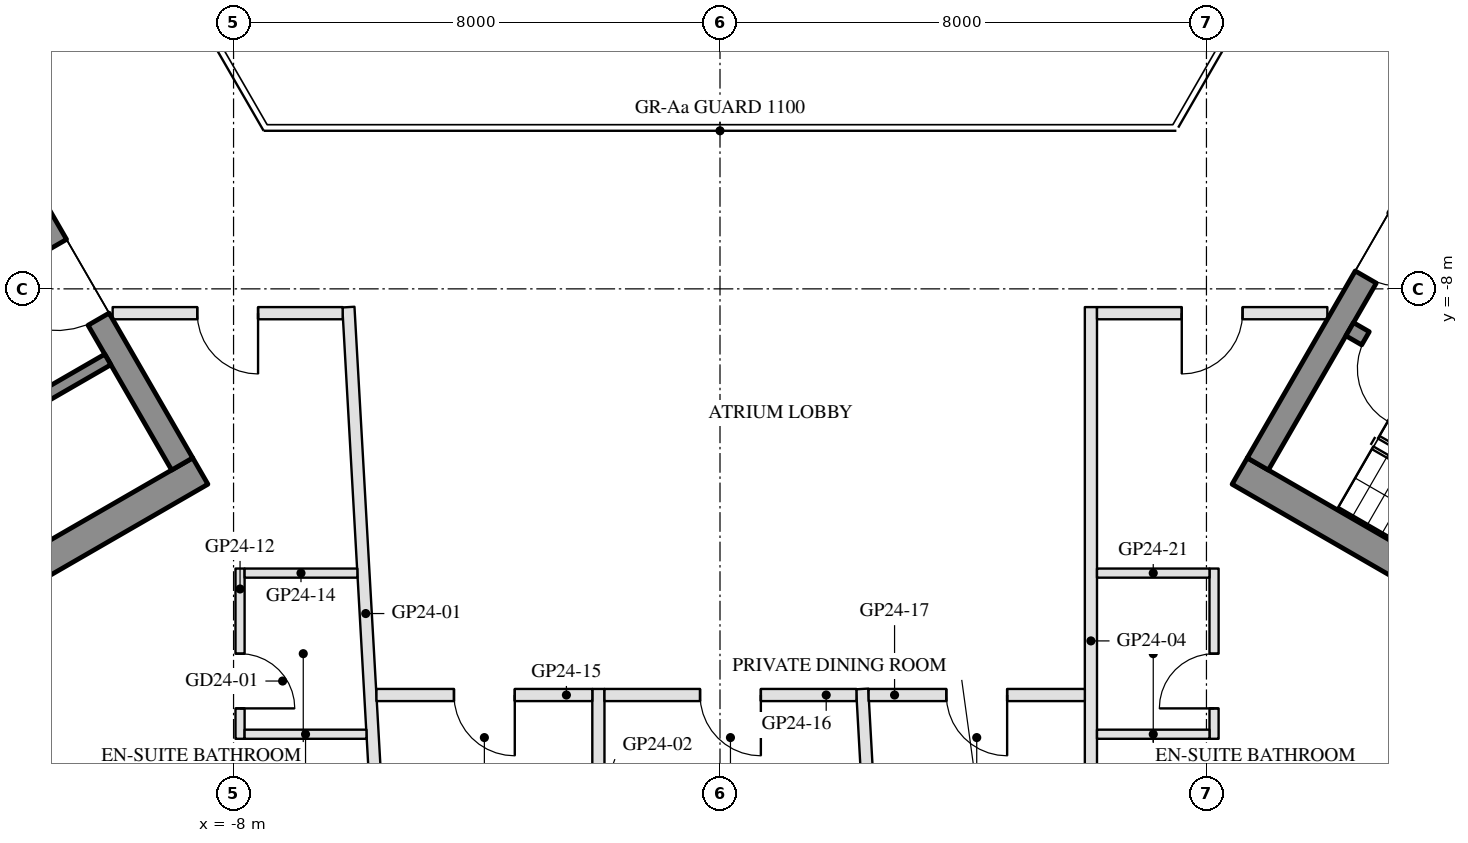
"""IFC4 building model, lengths in metres.
Left out: names, types, materials, properties, quantities, classifications, styles, units other than length and angle.
Written with IfcOpenShell. Run it as: python <this file> out.ifc"""

import sys

from ifc_helpers import new_model, si_unit, direction, frame, frame_2d, origin, place, context, subcontext, project, spatial, rectangle, extrude, element, fill, save


model = new_model("IFC4")
c1 = context("Model", 3, precision=1e-05, world=origin(), true_north=direction((0.0, 1.0)))
c2 = subcontext(c1, "Body", "Model", "MODEL_VIEW")
j1 = project(units=[si_unit("LENGTHUNIT", "METRE"), si_unit("PLANEANGLEUNIT", "RADIAN")], contexts=[c1])
p1 = place(None, origin())
s1 = spatial("IfcSite", under=j1, at=p1, CompositionType="ELEMENT")
p2 = place(p1, origin())
s2 = spatial("IfcBuilding", under=s1, at=p2, CompositionType="ELEMENT")
p3 = place(p2, frame((0.0, 0.0, 254.1)))
s3 = spatial("IfcBuildingStorey", under=s2, at=p3, CompositionType="ELEMENT", Elevation=254.1)
p4 = place(p3, frame((-8.547, -10.997, 0.0), z_axis=(0.0, 0.0, 1.0), x_axis=(-0.866025009528, -0.500000682871, 0.0)))
e1 = element("IfcWall", 1, at=p4, inside=s3, PredefinedType="SHEAR", context=c2, shape_type="SweptSolid", body=[
    extrude(rectangle(XDim=14.837, YDim=0.5, at=frame_2d((7.418, 0.0))), origin(), (0.0, 0.0, 1.0), 3.5),
])
p5 = place(p3, frame((-13.845, -2.22, 0.0), z_axis=(0.0, 0.0, 1.0), x_axis=(0.500004234368, -0.866022959057, 0.0)))
e2 = element("IfcWall", 2, at=p5, inside=s3, PredefinedType="SHEAR", context=c2, shape_type="SweptSolid", body=[
    extrude(rectangle(XDim=10.0, YDim=0.4, at=frame_2d((5.0, 0.0))), origin(), (0.0, 0.0, 1.0), 3.5),
])
p6 = place(p5, frame((3.55, 0.0, 0.0)))
e3 = element("IfcOpeningElement", 3, at=p6, cuts=e2, PredefinedType="OPENING", context=c2, shape_type="SweptSolid", body=[
    extrude(rectangle(XDim=1.1, YDim=2.1, at=frame_2d((0.55, 1.05))), frame((0.0, 0.21, 0.0), z_axis=(0.0, -1.0, 0.0), x_axis=(1.0, 0.0, 0.0)), (0.0, 0.0, 1.0), 0.42),
])
p7 = place(p5, frame((5.85, 0.0, 0.0)))
e4 = element("IfcOpeningElement", 4, at=p7, cuts=e2, PredefinedType="OPENING", context=c2, shape_type="SweptSolid", body=[
    extrude(rectangle(XDim=1.4, YDim=2.1, at=frame_2d((0.7, 1.05))), frame((0.0, 0.21, 0.0), z_axis=(0.0, -1.0, 0.0), x_axis=(1.0, 0.0, 0.0)), (0.0, 0.0, 1.0), 0.42),
])
p8 = place(p3, frame((-10.068, -9.162, 0.0), z_axis=(0.0, 0.0, 1.0), x_axis=(-0.866032725843, -0.499987317609, 0.0)))
e5 = element("IfcWall", 5, at=p8, inside=s3, PredefinedType="SHEAR", context=c2, shape_type="SweptSolid", body=[
    extrude(rectangle(XDim=10.16, YDim=0.2, at=frame_2d((5.08, 0.0))), origin(), (0.0, 0.0, 1.0), 3.5),
])
p9 = place(p8, frame((1.99, 0.0, 0.0)))
e6 = element("IfcOpeningElement", 6, at=p9, cuts=e5, PredefinedType="OPENING", context=c2, shape_type="SweptSolid", body=[
    extrude(rectangle(XDim=0.9, YDim=2.1, at=frame_2d((0.45, 1.05))), frame((0.0, 0.11, 0.0), z_axis=(0.0, -1.0, 0.0), x_axis=(1.0, 0.0, 0.0)), (0.0, 0.0, 1.0), 0.22),
])
p10 = place(p8, frame((7.07, 0.0, 0.0)))
e7 = element("IfcOpeningElement", 7, at=p10, cuts=e5, PredefinedType="OPENING", context=c2, shape_type="SweptSolid", body=[
    extrude(rectangle(XDim=0.9, YDim=2.1, at=frame_2d((0.45, 1.05))), frame((0.0, 0.11, 0.0), z_axis=(0.0, -1.0, 0.0), x_axis=(1.0, 0.0, 0.0)), (0.0, 0.0, 1.0), 0.22),
])
p11 = place(p3, frame((8.547, -10.997, 0.0), z_axis=(0.0, 0.0, 1.0), x_axis=(0.866025009528, -0.500000682871, 0.0)))
e8 = element("IfcWall", 8, at=p11, inside=s3, PredefinedType="SHEAR", context=c2, shape_type="SweptSolid", body=[
    extrude(rectangle(XDim=14.837, YDim=0.5, at=frame_2d((7.418, 0.0))), origin(), (0.0, 0.0, 1.0), 3.5),
])
p12 = place(p3, frame((8.845, -10.88, 0.0), z_axis=(0.0, 0.0, 1.0), x_axis=(0.500004234368, 0.866022959057, 0.0)))
e9 = element("IfcWall", 9, at=p12, inside=s3, PredefinedType="SHEAR", context=c2, shape_type="SweptSolid", body=[
    extrude(rectangle(XDim=10.0, YDim=0.4, at=frame_2d((5.0, 0.0))), origin(), (0.0, 0.0, 1.0), 3.5),
])
p13 = place(p12, frame((3.55, 0.0, 0.0)))
e10 = element("IfcOpeningElement", 10, at=p13, cuts=e9, PredefinedType="OPENING", context=c2, shape_type="SweptSolid", body=[
    extrude(rectangle(XDim=1.1, YDim=2.1, at=frame_2d((0.55, 1.05))), frame((0.0, 0.21, 0.0), z_axis=(0.0, -1.0, 0.0), x_axis=(1.0, 0.0, 0.0)), (0.0, 0.0, 1.0), 0.42),
])
p14 = place(p12, frame((5.85, 0.0, 0.0)))
e11 = element("IfcOpeningElement", 11, at=p14, cuts=e9, PredefinedType="OPENING", context=c2, shape_type="SweptSolid", body=[
    extrude(rectangle(XDim=1.4, YDim=2.1, at=frame_2d((0.7, 1.05))), frame((0.0, 0.21, 0.0), z_axis=(0.0, -1.0, 0.0), x_axis=(1.0, 0.0, 0.0)), (0.0, 0.0, 1.0), 0.42),
])
p15 = place(p3, frame((10.356, -8.664, 0.0), z_axis=(0.0, 0.0, 1.0), x_axis=(0.866028629588, -0.499994412703, 0.0)))
e12 = element("IfcWall", 12, at=p15, inside=s3, PredefinedType="SHEAR", context=c2, shape_type="SweptSolid", body=[
    extrude(rectangle(XDim=6.45, YDim=0.25, at=frame_2d((3.225, 0.0))), origin(), (0.0, 0.0, 1.0), 3.5),
])
p16 = place(p15, frame((0.3, 0.0, 0.0)))
e13 = element("IfcOpeningElement", 13, at=p16, cuts=e12, PredefinedType="OPENING", context=c2, shape_type="SweptSolid", body=[
    extrude(rectangle(XDim=1.0, YDim=2.1, at=frame_2d((0.5, 1.05))), frame((0.0, 0.135, 0.0), z_axis=(0.0, -1.0, 0.0), x_axis=(1.0, 0.0, 0.0)), (0.0, 0.0, 1.0), 0.27),
])
p17 = place(p3, frame((-5.541, -18.38, 0.0), z_axis=(0.0, 0.0, 1.0), x_axis=(-0.056489207214, 0.998403209865, 0.0)))
e14 = element("IfcWall", 14, at=p17, inside=s3, PredefinedType="PARTITIONING", context=c2, shape_type="SweptSolid", body=[
    extrude(rectangle(XDim=10.096, YDim=0.2, at=frame_2d((5.048, 0.0))), origin(), (0.0, 0.0, 1.0), 3.1),
])
p18 = place(p3, frame((-2.0, -18.38, 0.0), z_axis=(0.0, 0.0, 1.0), x_axis=(0.0, 1.0, 0.0)))
e15 = element("IfcWall", 15, at=p18, inside=s3, PredefinedType="PARTITIONING", context=c2, shape_type="SweptSolid", body=[
    extrude(rectangle(XDim=3.8, YDim=0.2, at=frame_2d((1.9, 0.0))), origin(), (0.0, 0.0, 1.0), 3.1),
])
p19 = place(p3, frame((2.6, -19.28, 0.0), z_axis=(0.0, 0.0, 1.0), x_axis=(-0.055599282702, 0.99845316353, 0.0)))
e16 = element("IfcWall", 16, at=p19, inside=s3, PredefinedType="PARTITIONING", context=c2, shape_type="SweptSolid", body=[
    extrude(rectangle(XDim=4.707, YDim=0.2, at=frame_2d((2.354, 0.0))), origin(), (0.0, 0.0, 1.0), 3.1),
])
p20 = place(p3, frame((6.1, -19.28, 0.0), z_axis=(0.0, 0.0, 1.0), x_axis=(0.0, 1.0, 0.0)))
e17 = element("IfcWall", 17, at=p20, inside=s3, PredefinedType="PARTITIONING", context=c2, shape_type="SweptSolid", body=[
    extrude(rectangle(XDim=10.98, YDim=0.2, at=frame_2d((5.49, 0.0))), origin(), (0.0, 0.0, 1.0), 3.1),
])
p21 = place(p3, frame((-6.206, -8.4, 0.0), z_axis=(0.0, 0.0, 1.0), x_axis=(-1.0, 0.0, 0.0)))
e18 = element("IfcWall", 18, at=p21, inside=s3, PredefinedType="PARTITIONING", context=c2, shape_type="SweptSolid", body=[
    extrude(rectangle(XDim=3.782, YDim=0.2, at=frame_2d((1.891, 0.0))), origin(), (0.0, 0.0, 1.0), 3.0),
])
p22 = place(p21, frame((1.391, 0.0, 0.0)))
e19 = element("IfcOpeningElement", 19, at=p22, cuts=e18, PredefinedType="OPENING", context=c2, shape_type="SweptSolid", body=[
    extrude(rectangle(XDim=1.0, YDim=2.1, at=frame_2d((0.5, 1.05))), frame((0.0, 0.11, 0.0), z_axis=(0.0, -1.0, 0.0), x_axis=(1.0, 0.0, 0.0)), (0.0, 0.0, 1.0), 0.22),
])
p23 = place(p3, frame((-7.893, -12.6, 0.0), z_axis=(0.0, 0.0, 1.0), x_axis=(0.0, -1.0, 0.0)))
e20 = element("IfcWall", 20, at=p23, inside=s3, PredefinedType="PARTITIONING", context=c2, shape_type="SweptSolid", body=[
    extrude(rectangle(XDim=2.8, YDim=0.15, at=frame_2d((1.4, 0.0))), origin(), (0.0, 0.0, 1.0), 3.55),
])
p24 = place(p23, frame((1.4, 0.0, 0.0)))
e21 = element("IfcOpeningElement", 21, at=p24, cuts=e20, PredefinedType="OPENING", context=c2, shape_type="SweptSolid", body=[
    extrude(rectangle(XDim=0.9, YDim=2.1, at=frame_2d((0.45, 1.05))), frame((0.0, 0.085, 0.0), z_axis=(0.0, -1.0, 0.0), x_axis=(1.0, 0.0, 0.0)), (0.0, 0.0, 1.0), 0.17),
])
p25 = place(p3, frame((-7.818, -15.325, 0.0), z_axis=(0.0, 0.0, 1.0), x_axis=(1.0, 0.0, 0.0)))
e22 = element("IfcWall", 22, at=p25, inside=s3, PredefinedType="PARTITIONING", context=c2, shape_type="SweptSolid", body=[
    extrude(rectangle(XDim=2.004, YDim=0.15, at=frame_2d((1.002, 0.0))), origin(), (0.0, 0.0, 1.0), 3.0),
])
p26 = place(p3, frame((-7.818, -12.675, 0.0), z_axis=(0.0, 0.0, 1.0), x_axis=(1.0, 0.0, 0.0)))
e23 = element("IfcWall", 23, at=p26, inside=s3, PredefinedType="PARTITIONING", context=c2, shape_type="SweptSolid", body=[
    extrude(rectangle(XDim=1.854, YDim=0.15, at=frame_2d((0.927, 0.0))), origin(), (0.0, 0.0, 1.0), 3.0),
])
p27 = place(p3, frame((-2.1, -14.68, 0.0), z_axis=(0.0, 0.0, 1.0), x_axis=(-1.0, 0.0, 0.0)))
e24 = element("IfcWall", 24, at=p27, inside=s3, PredefinedType="PARTITIONING", context=c2, shape_type="SweptSolid", body=[
    extrude(rectangle(XDim=3.55, YDim=0.2, at=frame_2d((1.775, 0.0))), origin(), (0.0, 0.0, 1.0), 3.0),
])
p28 = place(p27, frame((1.275, 0.0, 0.0)))
e25 = element("IfcOpeningElement", 25, at=p28, cuts=e24, PredefinedType="OPENING", context=c2, shape_type="SweptSolid", body=[
    extrude(rectangle(XDim=1.0, YDim=2.1, at=frame_2d((0.5, 1.05))), frame((0.0, 0.11, 0.0), z_axis=(0.0, -1.0, 0.0), x_axis=(1.0, 0.0, 0.0)), (0.0, 0.0, 1.0), 0.22),
])
p29 = place(p3, frame((2.244, -14.68, 0.0), z_axis=(0.0, 0.0, 1.0), x_axis=(-1.0, 0.0, 0.0)))
e26 = element("IfcWall", 26, at=p29, inside=s3, PredefinedType="PARTITIONING", context=c2, shape_type="SweptSolid", body=[
    extrude(rectangle(XDim=4.144, YDim=0.2, at=frame_2d((2.072, 0.0))), origin(), (0.0, 0.0, 1.0), 3.0),
])
p30 = place(p29, frame((1.572, 0.0, 0.0)))
e27 = element("IfcOpeningElement", 27, at=p30, cuts=e26, PredefinedType="OPENING", context=c2, shape_type="SweptSolid", body=[
    extrude(rectangle(XDim=1.0, YDim=2.1, at=frame_2d((0.5, 1.05))), frame((0.0, 0.11, 0.0), z_axis=(0.0, -1.0, 0.0), x_axis=(1.0, 0.0, 0.0)), (0.0, 0.0, 1.0), 0.22),
])
p31 = place(p3, frame((6.0, -14.68, 0.0), z_axis=(0.0, 0.0, 1.0), x_axis=(-1.0, 0.0, 0.0)))
e28 = element("IfcWall", 28, at=p31, inside=s3, PredefinedType="PARTITIONING", context=c2, shape_type="SweptSolid", body=[
    extrude(rectangle(XDim=3.556, YDim=0.2, at=frame_2d((1.778, 0.0))), origin(), (0.0, 0.0, 1.0), 3.0),
])
p32 = place(p31, frame((1.278, 0.0, 0.0)))
e29 = element("IfcOpeningElement", 29, at=p32, cuts=e28, PredefinedType="OPENING", context=c2, shape_type="SweptSolid", body=[
    extrude(rectangle(XDim=1.0, YDim=2.1, at=frame_2d((0.5, 1.05))), frame((0.0, 0.11, 0.0), z_axis=(0.0, -1.0, 0.0), x_axis=(1.0, 0.0, 0.0)), (0.0, 0.0, 1.0), 0.22),
])
p33 = place(p3, frame((9.988, -8.4, 0.0), z_axis=(0.0, 0.0, 1.0), x_axis=(-1.0, 0.0, 0.0)))
e30 = element("IfcWall", 30, at=p33, inside=s3, PredefinedType="PARTITIONING", context=c2, shape_type="SweptSolid", body=[
    extrude(rectangle(XDim=3.788, YDim=0.2, at=frame_2d((1.894, 0.0))), origin(), (0.0, 0.0, 1.0), 3.0),
])
p34 = place(p33, frame((1.394, 0.0, 0.0)))
e31 = element("IfcOpeningElement", 31, at=p34, cuts=e30, PredefinedType="OPENING", context=c2, shape_type="SweptSolid", body=[
    extrude(rectangle(XDim=1.0, YDim=2.1, at=frame_2d((0.5, 1.05))), frame((0.0, 0.11, 0.0), z_axis=(0.0, -1.0, 0.0), x_axis=(1.0, 0.0, 0.0)), (0.0, 0.0, 1.0), 0.22),
])
p35 = place(p3, frame((8.125, -15.4, 0.0), z_axis=(0.0, 0.0, 1.0), x_axis=(0.0, 1.0, 0.0)))
e32 = element("IfcWall", 32, at=p35, inside=s3, PredefinedType="PARTITIONING", context=c2, shape_type="SweptSolid", body=[
    extrude(rectangle(XDim=2.8, YDim=0.15, at=frame_2d((1.4, 0.0))), origin(), (0.0, 0.0, 1.0), 3.55),
])
p36 = place(p35, frame((0.5, 0.0, 0.0)))
e33 = element("IfcOpeningElement", 33, at=p36, cuts=e32, PredefinedType="OPENING", context=c2, shape_type="SweptSolid", body=[
    extrude(rectangle(XDim=0.9, YDim=2.1, at=frame_2d((0.45, 1.05))), frame((0.0, 0.085, 0.0), z_axis=(0.0, -1.0, 0.0), x_axis=(1.0, 0.0, 0.0)), (0.0, 0.0, 1.0), 0.17),
])
for number, where, z_axis, x_axis in (
    (34, (6.2, -15.325, 0.0), (0.0, 0.0, 1.0), (1.0, 0.0, 0.0)),
    (35, (6.2, -12.675, 0.0), (0.0, 0.0, 1.0), (1.0, 0.0, 0.0)),
):
    element("IfcWall", number, at=place(p3, frame(where, z_axis=z_axis, x_axis=x_axis)), inside=s3, PredefinedType="PARTITIONING", context=c2, shape_type="SweptSolid", body=[
        extrude(rectangle(XDim=1.85, YDim=0.15, at=frame_2d((0.925, 0.0))), origin(), (0.0, 0.0, 1.0), 3.0),
    ])
p37 = place(p3, frame((10.127, -0.741, 0.0), z_axis=(0.0, 0.0, 1.0), x_axis=(0.500038251005, -0.86600331843, 0.0)))
e36 = element("IfcWall", 36, at=p37, inside=s3, PredefinedType="PARTITIONING", context=c2, shape_type="SweptSolid", body=[
    extrude(rectangle(XDim=4.283, YDim=0.2, at=frame_2d((2.142, 0.0))), origin(), (0.0, 0.0, 1.0), 3.0),
])
p38 = place(p37, frame((1.641, 0.0, 0.0)))
e37 = element("IfcOpeningElement", 37, at=p38, cuts=e36, PredefinedType="OPENING", context=c2, shape_type="SweptSolid", body=[
    extrude(rectangle(XDim=1.0, YDim=2.1, at=frame_2d((0.5, 1.05))), frame((0.0, 0.11, 0.0), z_axis=(0.0, -1.0, 0.0), x_axis=(1.0, 0.0, 0.0)), (0.0, 0.0, 1.0), 0.22),
])
p39 = place(p3, frame((-12.269, -4.45, 0.0), z_axis=(0.0, 0.0, 1.0), x_axis=(0.500004836318, 0.866022611517, 0.0)))
e38 = element("IfcWall", 38, at=p39, inside=s3, PredefinedType="PARTITIONING", context=c2, shape_type="SweptSolid", body=[
    extrude(rectangle(XDim=5.488, YDim=0.2, at=frame_2d((2.744, 0.0))), origin(), (0.0, 0.0, 1.0), 3.0),
])
p40 = place(p39, frame((2.244, 0.0, 0.0)))
e39 = element("IfcOpeningElement", 39, at=p40, cuts=e38, PredefinedType="OPENING", context=c2, shape_type="SweptSolid", body=[
    extrude(rectangle(XDim=1.0, YDim=2.1, at=frame_2d((0.5, 1.05))), frame((0.0, 0.11, 0.0), z_axis=(0.0, -1.0, 0.0), x_axis=(1.0, 0.0, 0.0)), (0.0, 0.0, 1.0), 0.22),
])
p41 = place(p7, frame((1.4, 0.0, 0.0), z_axis=(0.0, 0.0, 1.0), x_axis=(-1.0, 0.0, 0.0)))
e40 = element("IfcDoor", 40, at=p41, inside=s3, OperationType="DOUBLE_DOOR_SINGLE_SWING", PredefinedType="DOOR", context=c2, shape_type="SweptSolid", body=[
    extrude(rectangle(XDim=1.4, YDim=2.1, at=frame_2d((0.7, 1.05))), frame((0.0, 0.025, 0.0), z_axis=(0.0, -1.0, 0.0), x_axis=(1.0, 0.0, 0.0)), (0.0, 0.0, 1.0), 0.05),
])
fill(e4, e40)
p42 = place(p13, frame((1.1, 0.0, 0.0), z_axis=(0.0, 0.0, 1.0), x_axis=(-1.0, 0.0, 0.0)))
e41 = element("IfcDoor", 41, at=p42, inside=s3, OperationType="SINGLE_SWING_LEFT", PredefinedType="DOOR", context=c2, shape_type="SweptSolid", body=[
    extrude(rectangle(XDim=1.1, YDim=2.1, at=frame_2d((0.55, 1.05))), frame((0.0, 0.025, 0.0), z_axis=(0.0, -1.0, 0.0), x_axis=(1.0, 0.0, 0.0)), (0.0, 0.0, 1.0), 0.05),
])
fill(e10, e41)
p43 = place(p16, frame((1.0, 0.0, 0.0), z_axis=(0.0, 0.0, 1.0), x_axis=(-1.0, 0.0, 0.0)))
e42 = element("IfcDoor", 42, at=p43, inside=s3, OperationType="SINGLE_SWING_LEFT", PredefinedType="DOOR", context=c2, shape_type="SweptSolid", body=[
    extrude(rectangle(XDim=1.0, YDim=2.1, at=frame_2d((0.5, 1.05))), frame((0.0, 0.025, 0.0), z_axis=(0.0, -1.0, 0.0), x_axis=(1.0, 0.0, 0.0)), (0.0, 0.0, 1.0), 0.05),
])
fill(e13, e42)
p44 = place(p24, origin())
e43 = element("IfcDoor", 43, at=p44, inside=s3, OperationType="SINGLE_SWING_RIGHT", PredefinedType="DOOR", context=c2, shape_type="SweptSolid", body=[
    extrude(rectangle(XDim=0.9, YDim=2.1, at=frame_2d((0.45, 1.05))), frame((0.0, 0.025, 0.0), z_axis=(0.0, -1.0, 0.0), x_axis=(1.0, 0.0, 0.0)), (0.0, 0.0, 1.0), 0.05),
])
fill(e21, e43)
p45 = place(p22, origin())
e44 = element("IfcDoor", 44, at=p45, inside=s3, OperationType="SINGLE_SWING_LEFT", PredefinedType="DOOR", context=c2, shape_type="SweptSolid", body=[
    extrude(rectangle(XDim=1.0, YDim=2.1, at=frame_2d((0.5, 1.05))), frame((0.0, 0.025, 0.0), z_axis=(0.0, -1.0, 0.0), x_axis=(1.0, 0.0, 0.0)), (0.0, 0.0, 1.0), 0.05),
])
fill(e19, e44)
p46 = place(p28, origin())
e45 = element("IfcDoor", 45, at=p46, inside=s3, OperationType="SINGLE_SWING_LEFT", PredefinedType="DOOR", context=c2, shape_type="SweptSolid", body=[
    extrude(rectangle(XDim=1.0, YDim=2.1, at=frame_2d((0.5, 1.05))), frame((0.0, 0.025, 0.0), z_axis=(0.0, -1.0, 0.0), x_axis=(1.0, 0.0, 0.0)), (0.0, 0.0, 1.0), 0.05),
])
fill(e25, e45)
p47 = place(p30, origin())
e46 = element("IfcDoor", 46, at=p47, inside=s3, OperationType="SINGLE_SWING_LEFT", PredefinedType="DOOR", context=c2, shape_type="SweptSolid", body=[
    extrude(rectangle(XDim=1.0, YDim=2.1, at=frame_2d((0.5, 1.05))), frame((0.0, 0.025, 0.0), z_axis=(0.0, -1.0, 0.0), x_axis=(1.0, 0.0, 0.0)), (0.0, 0.0, 1.0), 0.05),
])
fill(e27, e46)
p48 = place(p32, origin())
e47 = element("IfcDoor", 47, at=p48, inside=s3, OperationType="SINGLE_SWING_LEFT", PredefinedType="DOOR", context=c2, shape_type="SweptSolid", body=[
    extrude(rectangle(XDim=1.0, YDim=2.1, at=frame_2d((0.5, 1.05))), frame((0.0, 0.025, 0.0), z_axis=(0.0, -1.0, 0.0), x_axis=(1.0, 0.0, 0.0)), (0.0, 0.0, 1.0), 0.05),
])
fill(e29, e47)
p49 = place(p36, origin())
e48 = element("IfcDoor", 48, at=p49, inside=s3, OperationType="SINGLE_SWING_LEFT", PredefinedType="DOOR", context=c2, shape_type="SweptSolid", body=[
    extrude(rectangle(XDim=0.9, YDim=2.1, at=frame_2d((0.45, 1.05))), frame((0.0, 0.025, 0.0), z_axis=(0.0, -1.0, 0.0), x_axis=(1.0, 0.0, 0.0)), (0.0, 0.0, 1.0), 0.05),
])
fill(e33, e48)
p50 = place(p34, origin())
e49 = element("IfcDoor", 49, at=p50, inside=s3, OperationType="SINGLE_SWING_RIGHT", PredefinedType="DOOR", context=c2, shape_type="SweptSolid", body=[
    extrude(rectangle(XDim=1.0, YDim=2.1, at=frame_2d((0.5, 1.05))), frame((0.0, 0.025, 0.0), z_axis=(0.0, -1.0, 0.0), x_axis=(1.0, 0.0, 0.0)), (0.0, 0.0, 1.0), 0.05),
])
fill(e31, e49)
save(model, sys.argv[1])
